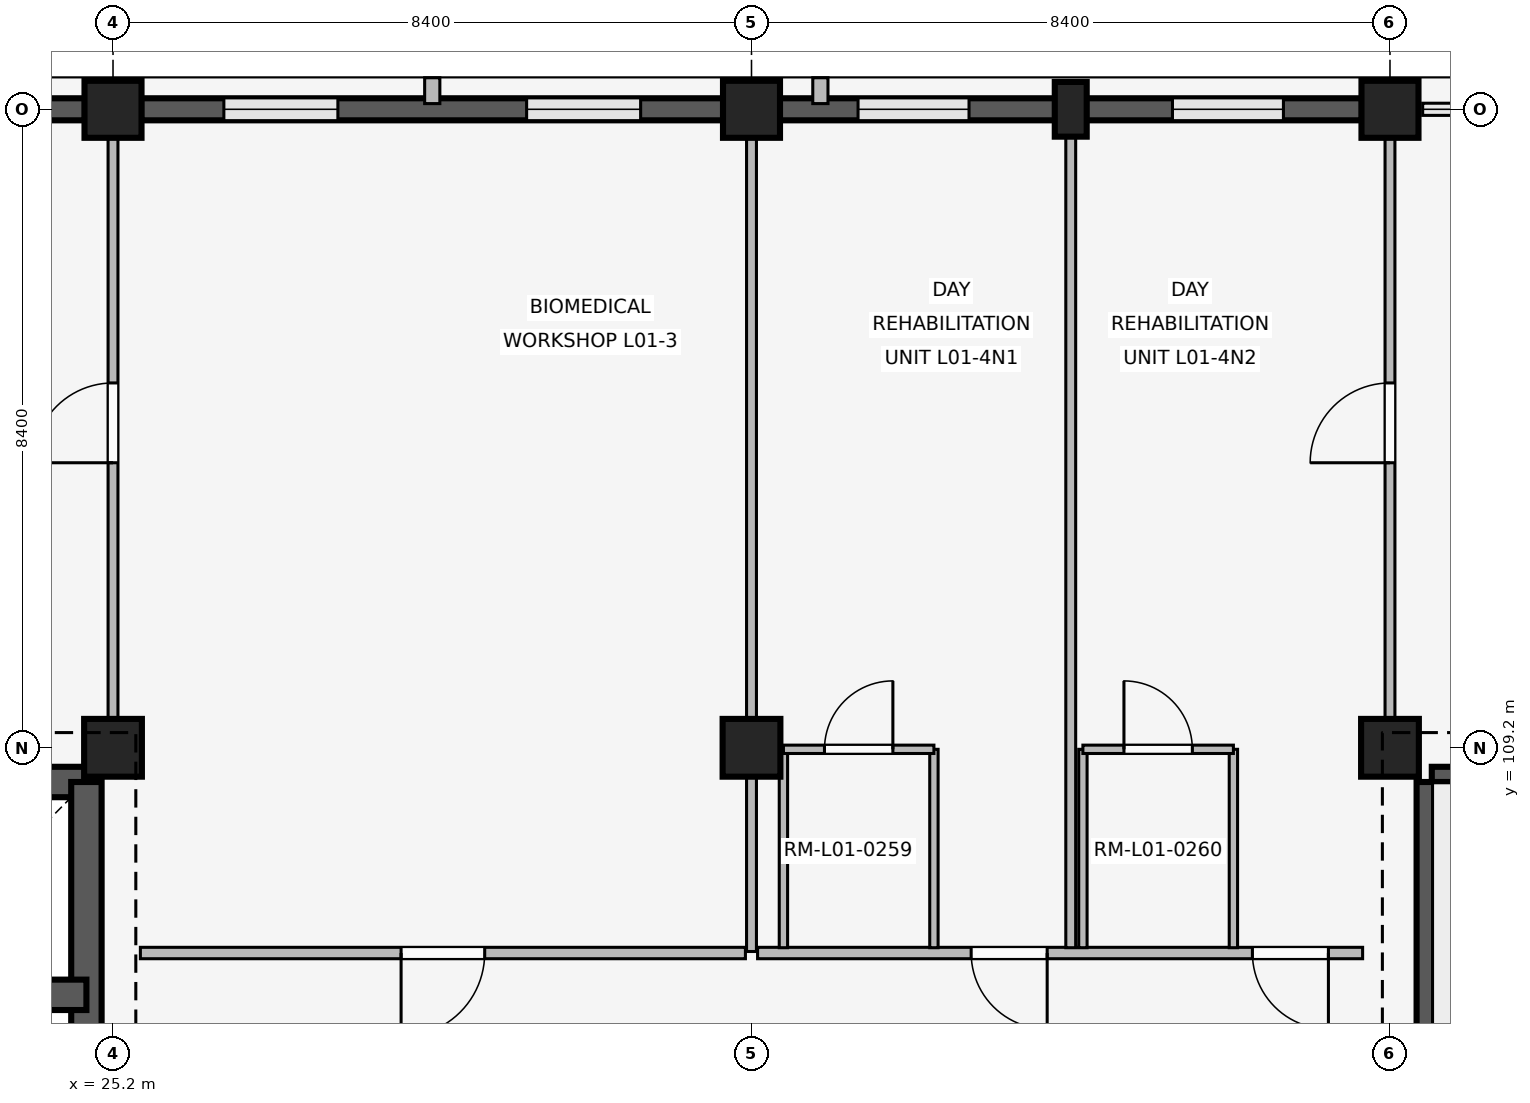
"""IFC4 building model, lengths in metres.
Left out: names, types, materials, properties, quantities, classifications, styles, units other than length and angle.
Written with IfcOpenShell. Run it as: python <this file> out.ifc"""

import sys

from ifc_helpers import new_model, si_unit, direction, frame, frame_2d, origin, origin_2d, place, context, subcontext, project, spatial, rectangle, extrude, element, fill, save


model = new_model("IFC4")
c1 = context("Model", 3, precision=1e-05, world=origin(), true_north=direction((0.0, 1.0)))
c2 = subcontext(c1, "Body", "Model", "MODEL_VIEW")
j1 = project(units=[si_unit("LENGTHUNIT", "METRE"), si_unit("PLANEANGLEUNIT", "RADIAN")], contexts=[c1])
p1 = place(None, origin())
s1 = spatial("IfcSite", under=j1, at=p1, CompositionType="ELEMENT")
p2 = place(p1, origin())
s2 = spatial("IfcBuilding", under=s1, at=p2, CompositionType="ELEMENT")
p3 = place(p2, frame((0.0, 0.0, 4.8)))
s3 = spatial("IfcBuildingStorey", under=s2, at=p3, CompositionType="ELEMENT", Elevation=4.8)
p4 = place(p3, frame((25.2, 109.2, 0.0), z_axis=(0.0, 0.0, 1.0), x_axis=(1.0, 0.0, 0.0)))
e1 = element("IfcColumn", 1, at=p4, inside=s3, PredefinedType="COLUMN", context=c2, shape_type="SweptSolid", body=[
    extrude(rectangle(XDim=0.76, YDim=0.76, at=origin_2d()), origin(), (0.0, 0.0, 1.0), 3.3),
])
p5 = place(p3, frame((25.2, 117.6, 0.0), z_axis=(0.0, 0.0, 1.0), x_axis=(1.0, 0.0, 0.0)))
e2 = element("IfcColumn", 2, at=p5, inside=s3, PredefinedType="COLUMN", context=c2, shape_type="SweptSolid", body=[
    extrude(rectangle(XDim=0.75, YDim=0.75, at=origin_2d()), origin(), (0.0, 0.0, 1.0), 3.3),
])
p6 = place(p3, frame((33.6, 109.2, 0.0), z_axis=(0.0, 0.0, 1.0), x_axis=(1.0, 0.0, 0.0)))
e3 = element("IfcColumn", 3, at=p6, inside=s3, PredefinedType="COLUMN", context=c2, shape_type="SweptSolid", body=[
    extrude(rectangle(XDim=0.76, YDim=0.76, at=origin_2d()), origin(), (0.0, 0.0, 1.0), 3.3),
])
p7 = place(p3, frame((33.6, 117.6, 0.0), z_axis=(0.0, 0.0, 1.0), x_axis=(1.0, 0.0, 0.0)))
e4 = element("IfcColumn", 4, at=p7, inside=s3, PredefinedType="COLUMN", context=c2, shape_type="SweptSolid", body=[
    extrude(rectangle(XDim=0.75, YDim=0.75, at=origin_2d()), origin(), (0.0, 0.0, 1.0), 3.3),
])
p8 = place(p3, frame((42.0, 109.2, 0.0), z_axis=(0.0, 0.0, 1.0), x_axis=(1.0, 0.0, 0.0)))
e5 = element("IfcColumn", 5, at=p8, inside=s3, PredefinedType="COLUMN", context=c2, shape_type="SweptSolid", body=[
    extrude(rectangle(XDim=0.76, YDim=0.76, at=origin_2d()), origin(), (0.0, 0.0, 1.0), 3.3),
])
p9 = place(p3, frame((42.0, 117.6, 0.0), z_axis=(0.0, 0.0, 1.0), x_axis=(1.0, 0.0, 0.0)))
e6 = element("IfcColumn", 6, at=p9, inside=s3, PredefinedType="COLUMN", context=c2, shape_type="SweptSolid", body=[
    extrude(rectangle(XDim=0.75, YDim=0.75, at=origin_2d()), origin(), (0.0, 0.0, 1.0), 3.3),
])
p10 = place(p3, frame((37.8, 117.6, 0.0), z_axis=(0.0, 0.0, 1.0), x_axis=(1.0, 0.0, 0.0)))
e7 = element("IfcColumn", 7, at=p10, inside=s3, PredefinedType="PILASTER", context=c2, shape_type="SweptSolid", body=[
    extrude(rectangle(XDim=0.42, YDim=0.72, at=origin_2d()), origin(), (0.0, 0.0, 1.0), 3.3),
])
p11 = place(p3, frame((17.17, 117.6, 0.0), z_axis=(0.0, 0.0, 1.0), x_axis=(1.0, 0.0, 0.0)))
e8 = element("IfcWall", 8, at=p11, inside=s3, PredefinedType="SOLIDWALL", context=c2, shape_type="SweptSolid", body=[
    extrude(rectangle(XDim=7.66, YDim=0.29, at=frame_2d((3.83, 0.0))), origin(), (0.0, 0.0, 1.0), 2.42),
])
p12 = place(p11, frame((1.112, 0.0, 1.05)))
e9 = element("IfcOpeningElement", 9, at=p12, cuts=e8, PredefinedType="OPENING", context=c2, shape_type="SweptSolid", body=[
    extrude(rectangle(XDim=1.3, YDim=0.75, at=frame_2d((0.65, 0.375))), frame((0.0, 0.155, 0.0), z_axis=(0.0, -1.0, 0.0), x_axis=(1.0, 0.0, 0.0)), (0.0, 0.0, 1.0), 0.31),
])
p13 = place(p11, frame((5.248, 0.0, 1.05)))
e10 = element("IfcOpeningElement", 10, at=p13, cuts=e8, PredefinedType="OPENING", context=c2, shape_type="SweptSolid", body=[
    extrude(rectangle(XDim=1.3, YDim=0.75, at=frame_2d((0.65, 0.375))), frame((0.0, 0.155, 0.0), z_axis=(0.0, -1.0, 0.0), x_axis=(1.0, 0.0, 0.0)), (0.0, 0.0, 1.0), 0.31),
])
p14 = place(p3, frame((25.57, 117.6, 0.0), z_axis=(0.0, 0.0, 1.0), x_axis=(1.0, 0.0, 0.0)))
e11 = element("IfcWall", 11, at=p14, inside=s3, PredefinedType="SOLIDWALL", context=c2, shape_type="SweptSolid", body=[
    extrude(rectangle(XDim=7.66, YDim=0.29, at=frame_2d((3.83, 0.0))), origin(), (0.0, 0.0, 1.0), 2.42),
])
p15 = place(p14, frame((1.088, 0.0, 1.05)))
e12 = element("IfcOpeningElement", 12, at=p15, cuts=e11, PredefinedType="OPENING", context=c2, shape_type="SweptSolid", body=[
    extrude(rectangle(XDim=1.5, YDim=0.75, at=frame_2d((0.75, 0.375))), frame((0.0, 0.155, 0.0), z_axis=(0.0, -1.0, 0.0), x_axis=(1.0, 0.0, 0.0)), (0.0, 0.0, 1.0), 0.31),
])
p16 = place(p14, frame((5.072, 0.0, 1.05)))
e13 = element("IfcOpeningElement", 13, at=p16, cuts=e11, PredefinedType="OPENING", context=c2, shape_type="SweptSolid", body=[
    extrude(rectangle(XDim=1.5, YDim=0.75, at=frame_2d((0.75, 0.375))), frame((0.0, 0.155, 0.0), z_axis=(0.0, -1.0, 0.0), x_axis=(1.0, 0.0, 0.0)), (0.0, 0.0, 1.0), 0.31),
])
p17 = place(p3, frame((29.4, 117.675, 0.0), z_axis=(0.0, 0.0, 1.0), x_axis=(0.0, 1.0, 0.0)))
e14 = element("IfcWall", 14, at=p17, inside=s3, PredefinedType="ELEMENTEDWALL", context=c2, shape_type="SweptSolid", body=[
    extrude(rectangle(XDim=0.34, YDim=0.2, at=frame_2d((0.17, 0.0))), origin(), (0.0, 0.0, 1.0), 2.4),
])
p18 = place(p3, frame((33.97, 117.6, 0.0), z_axis=(0.0, 0.0, 1.0), x_axis=(1.0, 0.0, 0.0)))
e15 = element("IfcWall", 15, at=p18, inside=s3, PredefinedType="SOLIDWALL", context=c2, shape_type="SweptSolid", body=[
    extrude(rectangle(XDim=7.66, YDim=0.29, at=frame_2d((3.83, 0.0))), origin(), (0.0, 0.0, 1.0), 2.42),
])
p19 = place(p18, frame((1.032, 0.0, 0.85)))
e16 = element("IfcOpeningElement", 16, at=p19, cuts=e15, PredefinedType="OPENING", context=c2, shape_type="SweptSolid", body=[
    extrude(rectangle(XDim=1.46, YDim=0.85, at=frame_2d((0.73, 0.425))), frame((0.0, 0.155, 0.0), z_axis=(0.0, -1.0, 0.0), x_axis=(1.0, 0.0, 0.0)), (0.0, 0.0, 1.0), 0.31),
])
p20 = place(p18, frame((5.168, 0.0, 0.85)))
e17 = element("IfcOpeningElement", 17, at=p20, cuts=e15, PredefinedType="OPENING", context=c2, shape_type="SweptSolid", body=[
    extrude(rectangle(XDim=1.46, YDim=0.85, at=frame_2d((0.73, 0.425))), frame((0.0, 0.155, 0.0), z_axis=(0.0, -1.0, 0.0), x_axis=(1.0, 0.0, 0.0)), (0.0, 0.0, 1.0), 0.31),
])
p21 = place(p3, frame((34.506, 117.675, 0.0), z_axis=(0.0, 0.0, 1.0), x_axis=(0.0, 1.0, 0.0)))
e18 = element("IfcWall", 18, at=p21, inside=s3, PredefinedType="ELEMENTEDWALL", context=c2, shape_type="SweptSolid", body=[
    extrude(rectangle(XDim=0.34, YDim=0.2, at=frame_2d((0.17, 0.0))), origin(), (0.0, 0.0, 1.0), 2.4),
])
p22 = place(p3, frame((42.55, 108.75, 0.0), z_axis=(0.0, 0.0, 1.0), x_axis=(1.0, 0.0, 0.0)))
e19 = element("IfcWall", 19, at=p22, inside=s3, PredefinedType="SHEAR", context=c2, shape_type="SweptSolid", body=[
    extrude(rectangle(XDim=7.5, YDim=0.4, at=frame_2d((3.75, 0.0))), origin(), (0.0, 0.0, 1.0), 3.02),
])
p23 = place(p3, frame((42.55, 101.2, 0.0), z_axis=(0.0, 0.0, 1.0), x_axis=(0.0, 1.0, 0.0)))
e20 = element("IfcWall", 20, at=p23, inside=s3, PredefinedType="SHEAR", context=c2, shape_type="SweptSolid", body=[
    extrude(rectangle(XDim=7.55, YDim=0.4, at=frame_2d((3.775, 0.0))), origin(), (0.0, 0.0, 1.0), 3.02),
])
p24 = place(p23, frame((0.28, 0.0, 0.0)))
e21 = element("IfcOpeningElement", 21, at=p24, cuts=e20, PredefinedType="OPENING", context=c2, shape_type="SweptSolid", body=[
    extrude(rectangle(XDim=1.0, YDim=2.15, at=frame_2d((0.5, 1.075))), frame((0.0, 0.21, 0.0), z_axis=(0.0, -1.0, 0.0), x_axis=(1.0, 0.0, 0.0)), (0.0, 0.0, 1.0), 0.42),
])
p25 = place(p3, frame((17.35, 108.75, 0.0), z_axis=(0.0, 0.0, 1.0), x_axis=(1.0, 0.0, 0.0)))
e22 = element("IfcWall", 22, at=p25, inside=s3, PredefinedType="SHEAR", context=c2, shape_type="SweptSolid", body=[
    extrude(rectangle(XDim=7.5, YDim=0.4, at=frame_2d((3.75, 0.0))), origin(), (0.0, 0.0, 1.0), 3.02),
])
p26 = place(p3, frame((24.85, 101.2, 0.0), z_axis=(0.0, 0.0, 1.0), x_axis=(0.0, 1.0, 0.0)))
e23 = element("IfcWall", 23, at=p26, inside=s3, PredefinedType="SHEAR", context=c2, shape_type="SweptSolid", body=[
    extrude(rectangle(XDim=7.55, YDim=0.4, at=frame_2d((3.775, 0.0))), origin(), (0.0, 0.0, 1.0), 3.02),
])
p27 = place(p26, frame((2.4, 0.0, 0.0)))
e24 = element("IfcOpeningElement", 24, at=p27, cuts=e23, PredefinedType="OPENING", context=c2, shape_type="SweptSolid", body=[
    extrude(rectangle(XDim=1.2, YDim=2.2, at=frame_2d((0.6, 1.1))), frame((0.0, 0.21, 0.0), z_axis=(0.0, -1.0, 0.0), x_axis=(1.0, 0.0, 0.0)), (0.0, 0.0, 1.0), 0.42),
])
p28 = place(p3, frame((21.05, 105.95, 0.0), z_axis=(0.0, 0.0, 1.0), x_axis=(1.0, 0.0, 0.0)))
e25 = element("IfcWall", 25, at=p28, inside=s3, PredefinedType="SHEAR", context=c2, shape_type="SweptSolid", body=[
    extrude(rectangle(XDim=3.8, YDim=0.4, at=frame_2d((1.9, 0.0))), origin(), (0.0, 0.0, 1.0), 3.02),
])
p29 = place(p28, frame((0.32, 0.0, 0.0)))
e26 = element("IfcOpeningElement", 26, at=p29, cuts=e25, PredefinedType="OPENING", context=c2, shape_type="SweptSolid", body=[
    extrude(rectangle(XDim=1.1, YDim=2.15, at=frame_2d((0.55, 1.075))), frame((0.0, 0.21, 0.0), z_axis=(0.0, -1.0, 0.0), x_axis=(1.0, 0.0, 0.0)), (0.0, 0.0, 1.0), 0.42),
])
p30 = place(p3, frame((25.2, 109.55, 0.0), z_axis=(0.0, 0.0, 1.0), x_axis=(0.0, 1.0, 0.0)))
e27 = element("IfcWall", 27, at=p30, inside=s3, PredefinedType="PARTITIONING", context=c2, shape_type="SweptSolid", body=[
    extrude(rectangle(XDim=7.91, YDim=0.13, at=frame_2d((3.955, 0.0))), origin(), (0.0, 0.0, 1.0), 2.4),
])
p31 = place(p30, frame((3.4, 0.0, 0.0)))
e28 = element("IfcOpeningElement", 28, at=p31, cuts=e27, PredefinedType="OPENING", context=c2, shape_type="SweptSolid", body=[
    extrude(rectangle(XDim=1.05, YDim=2.2, at=frame_2d((0.525, 1.1))), frame((0.0, 0.075, 0.0), z_axis=(0.0, -1.0, 0.0), x_axis=(1.0, 0.0, 0.0)), (0.0, 0.0, 1.0), 0.15),
])
p32 = place(p3, frame((33.52, 106.5, 0.0), z_axis=(0.0, 0.0, 1.0), x_axis=(-1.0, 0.0, 0.0)))
e29 = element("IfcWall", 29, at=p32, inside=s3, PredefinedType="PARTITIONING", context=c2, shape_type="SweptSolid", body=[
    extrude(rectangle(XDim=7.96, YDim=0.15, at=frame_2d((3.98, 0.0))), origin(), (0.0, 0.0, 1.0), 2.4),
])
p33 = place(p32, frame((3.43, 0.0, 0.0)))
e30 = element("IfcOpeningElement", 30, at=p33, cuts=e29, PredefinedType="OPENING", context=c2, shape_type="SweptSolid", body=[
    extrude(rectangle(XDim=1.1, YDim=2.2, at=frame_2d((0.55, 1.1))), frame((0.0, 0.085, 0.0), z_axis=(0.0, -1.0, 0.0), x_axis=(1.0, 0.0, 0.0)), (0.0, 0.0, 1.0), 0.17),
])
p34 = place(p3, frame((33.6, 106.52, 0.0), z_axis=(0.0, 0.0, 1.0), x_axis=(0.0, 1.0, 0.0)))
e31 = element("IfcWall", 31, at=p34, inside=s3, PredefinedType="PARTITIONING", context=c2, shape_type="SweptSolid", body=[
    extrude(rectangle(XDim=10.94, YDim=0.13, at=frame_2d((5.47, 0.0))), origin(), (0.0, 0.0, 1.0), 2.4),
])
p35 = place(p3, frame((41.64, 106.5, 0.0), z_axis=(0.0, 0.0, 1.0), x_axis=(-1.0, 0.0, 0.0)))
e32 = element("IfcWall", 32, at=p35, inside=s3, PredefinedType="PARTITIONING", context=c2, shape_type="SweptSolid", body=[
    extrude(rectangle(XDim=7.96, YDim=0.15, at=frame_2d((3.98, 0.0))), origin(), (0.0, 0.0, 1.0), 2.4),
])
p36 = place(p35, frame((0.45, 0.0, 0.0)))
e33 = element("IfcOpeningElement", 33, at=p36, cuts=e32, PredefinedType="OPENING", context=c2, shape_type="SweptSolid", body=[
    extrude(rectangle(XDim=1.0, YDim=2.15, at=frame_2d((0.5, 1.075))), frame((0.0, 0.085, 0.0), z_axis=(0.0, -1.0, 0.0), x_axis=(1.0, 0.0, 0.0)), (0.0, 0.0, 1.0), 0.17),
])
p37 = place(p35, frame((4.15, 0.0, 0.0)))
e34 = element("IfcOpeningElement", 34, at=p37, cuts=e32, PredefinedType="OPENING", context=c2, shape_type="SweptSolid", body=[
    extrude(rectangle(XDim=1.0, YDim=2.15, at=frame_2d((0.5, 1.075))), frame((0.0, 0.085, 0.0), z_axis=(0.0, -1.0, 0.0), x_axis=(1.0, 0.0, 0.0)), (0.0, 0.0, 1.0), 0.17),
])
p38 = place(p3, frame((37.8, 106.57, 0.0), z_axis=(0.0, 0.0, 1.0), x_axis=(0.0, 1.0, 0.0)))
e35 = element("IfcWall", 35, at=p38, inside=s3, PredefinedType="PARTITIONING", context=c2, shape_type="SweptSolid", body=[
    extrude(rectangle(XDim=10.93, YDim=0.13, at=frame_2d((5.465, 0.0))), origin(), (0.0, 0.0, 1.0), 2.4),
])
for number, where, z_axis, x_axis in (
    (36, (34.02, 106.57, 0.0), (0.0, 0.0, 1.0), (0.0, 1.0, 0.0)),
    (37, (36.0, 106.57, 0.0), (0.0, 0.0, 1.0), (0.0, 1.0, 0.0)),
):
    element("IfcWall", number, at=place(p3, frame(where, z_axis=z_axis, x_axis=x_axis)), inside=s3, PredefinedType="PARTITIONING", context=c2, shape_type="SweptSolid", body=[
        extrude(rectangle(XDim=2.61, YDim=0.11, at=frame_2d((1.305, 0.0))), origin(), (0.0, 0.0, 1.0), 2.4),
    ])
p39 = place(p3, frame((34.02, 109.18, 0.0), z_axis=(0.0, 0.0, 1.0), x_axis=(1.0, 0.0, 0.0)))
e38 = element("IfcWall", 38, at=p39, inside=s3, PredefinedType="PARTITIONING", context=c2, shape_type="SweptSolid", body=[
    extrude(rectangle(XDim=1.98, YDim=0.11, at=frame_2d((0.99, 0.0))), origin(), (0.0, 0.0, 1.0), 2.4),
])
p40 = place(p39, frame((0.54, 0.0, 0.0)))
e39 = element("IfcOpeningElement", 39, at=p40, cuts=e38, PredefinedType="OPENING", context=c2, shape_type="SweptSolid", body=[
    extrude(rectangle(XDim=0.9, YDim=2.1, at=frame_2d((0.45, 1.05))), frame((0.0, 0.065, 0.0), z_axis=(0.0, -1.0, 0.0), x_axis=(1.0, 0.0, 0.0)), (0.0, 0.0, 1.0), 0.13),
])
for number, where, z_axis, x_axis in (
    (40, (37.96, 106.57, 0.0), (0.0, 0.0, 1.0), (0.0, 1.0, 0.0)),
    (41, (39.94, 106.57, 0.0), (0.0, 0.0, 1.0), (0.0, 1.0, 0.0)),
):
    element("IfcWall", number, at=place(p3, frame(where, z_axis=z_axis, x_axis=x_axis)), inside=s3, PredefinedType="PARTITIONING", context=c2, shape_type="SweptSolid", body=[
        extrude(rectangle(XDim=2.61, YDim=0.11, at=frame_2d((1.305, 0.0))), origin(), (0.0, 0.0, 1.0), 2.4),
    ])
p41 = place(p3, frame((37.96, 109.18, 0.0), z_axis=(0.0, 0.0, 1.0), x_axis=(1.0, 0.0, 0.0)))
e42 = element("IfcWall", 42, at=p41, inside=s3, PredefinedType="PARTITIONING", context=c2, shape_type="SweptSolid", body=[
    extrude(rectangle(XDim=1.98, YDim=0.11, at=frame_2d((0.99, 0.0))), origin(), (0.0, 0.0, 1.0), 2.4),
])
p42 = place(p41, frame((0.54, 0.0, 0.0)))
e43 = element("IfcOpeningElement", 43, at=p42, cuts=e42, PredefinedType="OPENING", context=c2, shape_type="SweptSolid", body=[
    extrude(rectangle(XDim=0.9, YDim=2.1, at=frame_2d((0.45, 1.05))), frame((0.0, 0.065, 0.0), z_axis=(0.0, -1.0, 0.0), x_axis=(1.0, 0.0, 0.0)), (0.0, 0.0, 1.0), 0.13),
])
p43 = place(p3, frame((42.0, 109.55, 0.0), z_axis=(0.0, 0.0, 1.0), x_axis=(0.0, 1.0, 0.0)))
e44 = element("IfcWall", 44, at=p43, inside=s3, PredefinedType="PARTITIONING", context=c2, shape_type="SweptSolid", body=[
    extrude(rectangle(XDim=7.91, YDim=0.13, at=frame_2d((3.955, 0.0))), origin(), (0.0, 0.0, 1.0), 2.4),
])
p44 = place(p43, frame((3.4, 0.0, 0.0)))
e45 = element("IfcOpeningElement", 45, at=p44, cuts=e44, PredefinedType="OPENING", context=c2, shape_type="SweptSolid", body=[
    extrude(rectangle(XDim=1.05, YDim=2.2, at=frame_2d((0.525, 1.1))), frame((0.0, 0.075, 0.0), z_axis=(0.0, -1.0, 0.0), x_axis=(1.0, 0.0, 0.0)), (0.0, 0.0, 1.0), 0.15),
])
p45 = place(p15, origin())
e46 = element("IfcWindow", 46, at=p45, inside=s3, PartitioningType="SINGLE_PANEL", PredefinedType="WINDOW", context=c2, shape_type="SweptSolid", body=[
    extrude(rectangle(XDim=1.5, YDim=0.75, at=frame_2d((0.75, 0.375))), frame((0.0, 0.03, 0.0), z_axis=(0.0, -1.0, 0.0), x_axis=(1.0, 0.0, 0.0)), (0.0, 0.0, 1.0), 0.06),
])
fill(e12, e46)
p46 = place(p16, origin())
e47 = element("IfcWindow", 47, at=p46, inside=s3, PartitioningType="SINGLE_PANEL", PredefinedType="WINDOW", context=c2, shape_type="SweptSolid", body=[
    extrude(rectangle(XDim=1.5, YDim=0.75, at=frame_2d((0.75, 0.375))), frame((0.0, 0.03, 0.0), z_axis=(0.0, -1.0, 0.0), x_axis=(1.0, 0.0, 0.0)), (0.0, 0.0, 1.0), 0.06),
])
fill(e13, e47)
p47 = place(p19, origin())
e48 = element("IfcWindow", 48, at=p47, inside=s3, PartitioningType="SINGLE_PANEL", PredefinedType="WINDOW", context=c2, shape_type="SweptSolid", body=[
    extrude(rectangle(XDim=1.46, YDim=0.85, at=frame_2d((0.73, 0.425))), frame((0.0, 0.03, 0.0), z_axis=(0.0, -1.0, 0.0), x_axis=(1.0, 0.0, 0.0)), (0.0, 0.0, 1.0), 0.06),
])
fill(e16, e48)
p48 = place(p20, origin())
e49 = element("IfcWindow", 49, at=p48, inside=s3, PartitioningType="SINGLE_PANEL", PredefinedType="WINDOW", context=c2, shape_type="SweptSolid", body=[
    extrude(rectangle(XDim=1.46, YDim=0.85, at=frame_2d((0.73, 0.425))), frame((0.0, 0.03, 0.0), z_axis=(0.0, -1.0, 0.0), x_axis=(1.0, 0.0, 0.0)), (0.0, 0.0, 1.0), 0.06),
])
fill(e17, e49)
p49 = place(p31, origin())
e50 = element("IfcDoor", 50, at=p49, inside=s3, OperationType="SINGLE_SWING_LEFT", PredefinedType="DOOR", context=c2, shape_type="SweptSolid", body=[
    extrude(rectangle(XDim=1.05, YDim=2.2, at=frame_2d((0.525, 1.1))), frame((0.0, 0.025, 0.0), z_axis=(0.0, -1.0, 0.0), x_axis=(1.0, 0.0, 0.0)), (0.0, 0.0, 1.0), 0.05),
])
fill(e28, e50)
p50 = place(p33, origin())
e51 = element("IfcDoor", 51, at=p50, inside=s3, OperationType="SINGLE_SWING_RIGHT", PredefinedType="DOOR", context=c2, shape_type="SweptSolid", body=[
    extrude(rectangle(XDim=1.1, YDim=2.2, at=frame_2d((0.55, 1.1))), frame((0.0, 0.025, 0.0), z_axis=(0.0, -1.0, 0.0), x_axis=(1.0, 0.0, 0.0)), (0.0, 0.0, 1.0), 0.05),
])
fill(e30, e51)
p51 = place(p36, origin())
e52 = element("IfcDoor", 52, at=p51, inside=s3, OperationType="SINGLE_SWING_LEFT", PredefinedType="DOOR", context=c2, shape_type="SweptSolid", body=[
    extrude(rectangle(XDim=1.0, YDim=2.15, at=frame_2d((0.5, 1.075))), frame((0.0, 0.025, 0.0), z_axis=(0.0, -1.0, 0.0), x_axis=(1.0, 0.0, 0.0)), (0.0, 0.0, 1.0), 0.05),
])
fill(e33, e52)
p52 = place(p37, origin())
e53 = element("IfcDoor", 53, at=p52, inside=s3, OperationType="SINGLE_SWING_LEFT", PredefinedType="DOOR", context=c2, shape_type="SweptSolid", body=[
    extrude(rectangle(XDim=1.0, YDim=2.15, at=frame_2d((0.5, 1.075))), frame((0.0, 0.025, 0.0), z_axis=(0.0, -1.0, 0.0), x_axis=(1.0, 0.0, 0.0)), (0.0, 0.0, 1.0), 0.05),
])
fill(e34, e53)
p53 = place(p40, origin())
e54 = element("IfcDoor", 54, at=p53, inside=s3, OperationType="SINGLE_SWING_RIGHT", PredefinedType="DOOR", context=c2, shape_type="SweptSolid", body=[
    extrude(rectangle(XDim=0.9, YDim=2.1, at=frame_2d((0.45, 1.05))), frame((0.0, 0.025, 0.0), z_axis=(0.0, -1.0, 0.0), x_axis=(1.0, 0.0, 0.0)), (0.0, 0.0, 1.0), 0.05),
])
fill(e39, e54)
p54 = place(p42, origin())
e55 = element("IfcDoor", 55, at=p54, inside=s3, OperationType="SINGLE_SWING_LEFT", PredefinedType="DOOR", context=c2, shape_type="SweptSolid", body=[
    extrude(rectangle(XDim=0.9, YDim=2.1, at=frame_2d((0.45, 1.05))), frame((0.0, 0.025, 0.0), z_axis=(0.0, -1.0, 0.0), x_axis=(1.0, 0.0, 0.0)), (0.0, 0.0, 1.0), 0.05),
])
fill(e43, e55)
p55 = place(p44, origin())
e56 = element("IfcDoor", 56, at=p55, inside=s3, OperationType="SINGLE_SWING_LEFT", PredefinedType="DOOR", context=c2, shape_type="SweptSolid", body=[
    extrude(rectangle(XDim=1.05, YDim=2.2, at=frame_2d((0.525, 1.1))), frame((0.0, 0.025, 0.0), z_axis=(0.0, -1.0, 0.0), x_axis=(1.0, 0.0, 0.0)), (0.0, 0.0, 1.0), 0.05),
])
fill(e45, e56)
save(model, sys.argv[1])
